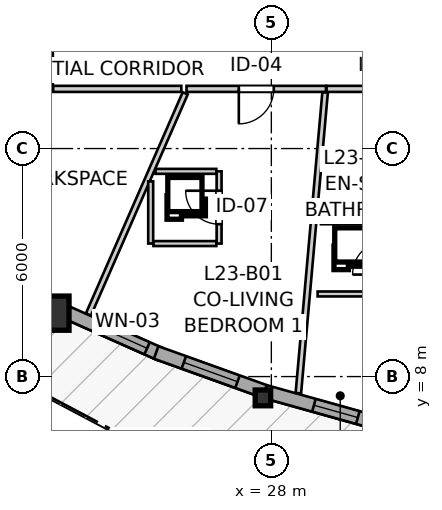
"""IFC4 building model, lengths in metres.
Left out: names, types, materials, properties, quantities, classifications, styles, units other than length and angle.
Written with IfcOpenShell. Run it as: python <this file> out.ifc"""

import sys

from ifc_helpers import new_model, si_unit, direction, frame, frame_2d, origin, origin_2d, place, context, subcontext, project, spatial, rectangle, i_section, extrude, source, transform, mapped, element, fill, save


model = new_model("IFC4")
c1 = context("Model", 3, precision=1e-05, world=origin(), true_north=direction((0.0, 1.0)))
c2 = subcontext(c1, "Body", "Model", "MODEL_VIEW")
j1 = project(units=[si_unit("LENGTHUNIT", "METRE"), si_unit("PLANEANGLEUNIT", "RADIAN")], contexts=[c1])
p1 = place(None, origin())
s1 = spatial("IfcSite", under=j1, at=p1, CompositionType="ELEMENT")
p2 = place(p1, origin())
s2 = spatial("IfcBuilding", under=s1, at=p2, CompositionType="ELEMENT")
p3 = place(p2, frame((0.0, 0.0, 80.0)))
s3 = spatial("IfcBuildingStorey", under=s2, at=p3, CompositionType="ELEMENT", Elevation=80.0)
m1 = source(origin(), c2, "Body", "SweptSolid", [
    extrude(rectangle(XDim=0.9, YDim=0.9, at=origin_2d()), origin(), (0.0, 0.0, 1.0), 2.935),
])
p4 = place(p3, frame((22.227, 9.669, 0.0), z_axis=(0.0, 0.0, 1.0), x_axis=(1.0, 0.0, 0.0)))
e1 = element("IfcColumn", 1, at=p4, inside=s3, PredefinedType="COLUMN", context=c2, shape_type="MappedRepresentation", body=[
    mapped(m1, transform((0.0, 0.0, 0.0), x_axis=(1.0, 0.0, 0.0), y_axis=(0.0, 1.0, 0.0), z_axis=(0.0, 0.0, 1.0), scale=1.0)),
])
m2 = source(origin(), c2, "Body", "SweptSolid", [
    extrude(i_section(OverallWidth=0.406, OverallDepth=0.416, WebThickness=0.027, FlangeThickness=0.044, FilletRadius=0.015, at=origin_2d()), origin(), (0.0, 0.0, 1.0), 2.935),
])
p5 = place(p3, frame((27.779, 7.439, 0.0), z_axis=(0.0, 0.0, 1.0), x_axis=(1.0, 0.0, 0.0)))
e2 = element("IfcColumn", 2, at=p5, inside=s3, PredefinedType="PILASTER", context=c2, shape_type="MappedRepresentation", body=[
    mapped(m2, transform((0.0, 0.0, 0.0), x_axis=(1.0, 0.0, 0.0), y_axis=(0.0, 1.0, 0.0), z_axis=(0.0, 0.0, 1.0), scale=1.0)),
])
p6 = place(p3, frame((22.503, 9.737, 0.0), z_axis=(0.0, 0.0, 1.0), x_axis=(0.913443049169, -0.406966578388, 0.0)))
e3 = element("IfcWall", 3, at=p6, inside=s3, PredefinedType="SOLIDWALL", context=c2, shape_type="SweptSolid", body=[
    extrude(rectangle(XDim=2.79, YDim=0.35, at=frame_2d((1.395, 0.0))), origin(), (0.0, 0.0, 1.0), 2.465),
])
p7 = place(p6, frame((0.938, 0.0, 0.82)))
e4 = element("IfcOpeningElement", 4, at=p7, cuts=e3, PredefinedType="OPENING", context=c2, shape_type="SweptSolid", body=[
    extrude(rectangle(XDim=1.5, YDim=1.45, at=frame_2d((0.75, 0.725))), frame((0.0, 0.185, 0.0), z_axis=(0.0, -1.0, 0.0), x_axis=(1.0, 0.0, 0.0)), (0.0, 0.0, 1.0), 0.37),
])
p8 = place(p3, frame((24.969, 8.635, 0.0), z_axis=(0.0, 0.0, 1.0), x_axis=(0.941099972293, -0.338128440315, 0.0)))
e5 = element("IfcWall", 5, at=p8, inside=s3, PredefinedType="SOLIDWALL", context=c2, shape_type="SweptSolid", body=[
    extrude(rectangle(XDim=3.028, YDim=0.35, at=frame_2d((1.514, 0.0))), origin(), (0.0, 0.0, 1.0), 2.465),
])
p9 = place(p8, frame((0.774, 0.0, 0.82)))
e6 = element("IfcOpeningElement", 6, at=p9, cuts=e5, PredefinedType="OPENING", context=c2, shape_type="SweptSolid", body=[
    extrude(rectangle(XDim=1.5, YDim=1.45, at=frame_2d((0.75, 0.725))), frame((0.0, 0.185, 0.0), z_axis=(0.0, -1.0, 0.0), x_axis=(1.0, 0.0, 0.0)), (0.0, 0.0, 1.0), 0.37),
])
p10 = place(p3, frame((27.845, 7.603, 0.0), z_axis=(0.0, 0.0, 1.0), x_axis=(0.963041412051, -0.269353371382, 0.0)))
e7 = element("IfcWall", 7, at=p10, inside=s3, PredefinedType="SOLIDWALL", context=c2, shape_type="SweptSolid", body=[
    extrude(rectangle(XDim=3.078, YDim=0.35, at=frame_2d((1.539, 0.0))), origin(), (0.0, 0.0, 1.0), 2.465),
])
p11 = place(p10, frame((1.324, 0.0, 0.82)))
e8 = element("IfcOpeningElement", 8, at=p11, cuts=e7, PredefinedType="OPENING", context=c2, shape_type="SweptSolid", body=[
    extrude(rectangle(XDim=1.2, YDim=1.45, at=frame_2d((0.6, 0.725))), frame((0.0, 0.185, 0.0), z_axis=(0.0, -1.0, 0.0), x_axis=(1.0, 0.0, 0.0)), (0.0, 0.0, 1.0), 0.37),
])
p12 = place(p3, frame((22.17, 15.57, 0.0), z_axis=(0.0, 0.0, 1.0), x_axis=(0.0, 1.0, 0.0)))
e9 = element("IfcWall", 9, at=p12, inside=s3, PredefinedType="PARTITIONING", context=c2, shape_type="SweptSolid", body=[
    extrude(rectangle(XDim=5.543, YDim=0.16, at=frame_2d((2.771, 0.0))), origin(), (0.0, 0.0, 1.0), 2.935),
])
p13 = place(p12, frame((2.283, 0.0, 0.0)))
e10 = element("IfcOpeningElement", 10, at=p13, cuts=e9, PredefinedType="OPENING", context=c2, shape_type="SweptSolid", body=[
    extrude(rectangle(XDim=0.96, YDim=2.1, at=frame_2d((0.48, 1.05))), frame((0.0, 0.09, 0.0), z_axis=(0.0, -1.0, 0.0), x_axis=(1.0, 0.0, 0.0)), (0.0, 0.0, 1.0), 0.18),
])
p14 = place(p3, frame((29.438, 15.57, 0.0), z_axis=(0.0, 0.0, 1.0), x_axis=(-1.0, 0.0, 0.0)))
e11 = element("IfcWall", 11, at=p14, inside=s3, PredefinedType="PARTITIONING", context=c2, shape_type="SweptSolid", body=[
    extrude(rectangle(XDim=3.67, YDim=0.16, at=frame_2d((1.835, 0.0))), origin(), (0.0, 0.0, 1.0), 2.935),
])
p15 = place(p14, frame((1.374, 0.0, 0.0)))
e12 = element("IfcOpeningElement", 12, at=p15, cuts=e11, PredefinedType="OPENING", context=c2, shape_type="SweptSolid", body=[
    extrude(rectangle(XDim=0.92, YDim=2.1, at=frame_2d((0.46, 1.05))), frame((0.0, 0.09, 0.0), z_axis=(0.0, -1.0, 0.0), x_axis=(1.0, 0.0, 0.0)), (0.0, 0.0, 1.0), 0.18),
])
p16 = place(p3, frame((32.525, 15.57, 0.0), z_axis=(0.0, 0.0, 1.0), x_axis=(-1.0, 0.0, 0.0)))
e13 = element("IfcWall", 13, at=p16, inside=s3, PredefinedType="PARTITIONING", context=c2, shape_type="SweptSolid", body=[
    extrude(rectangle(XDim=3.072, YDim=0.16, at=frame_2d((1.536, 0.0))), origin(), (0.0, 0.0, 1.0), 2.935),
])
p17 = place(p16, frame((1.098, 0.0, 0.0)))
e14 = element("IfcOpeningElement", 14, at=p17, cuts=e13, PredefinedType="OPENING", context=c2, shape_type="SweptSolid", body=[
    extrude(rectangle(XDim=0.92, YDim=2.1, at=frame_2d((0.46, 1.05))), frame((0.0, 0.09, 0.0), z_axis=(0.0, -1.0, 0.0), x_axis=(1.0, 0.0, 0.0)), (0.0, 0.0, 1.0), 0.18),
])
p18 = place(p3, frame((26.625, 11.5, 0.0), z_axis=(0.0, 0.0, 1.0), x_axis=(0.0, 1.0, 0.0)))
e15 = element("IfcWall", 15, at=p18, inside=s3, PredefinedType="PARTITIONING", context=c2, shape_type="SweptSolid", body=[
    extrude(rectangle(XDim=1.9, YDim=0.13, at=frame_2d((0.95, 0.0))), origin(), (0.0, 0.0, 1.0), 2.935),
])
p19 = place(p18, frame((0.51, 0.0, 0.0)))
e16 = element("IfcOpeningElement", 16, at=p19, cuts=e15, PredefinedType="OPENING", context=c2, shape_type="SweptSolid", body=[
    extrude(rectangle(XDim=0.88, YDim=2.05, at=frame_2d((0.44, 1.025))), frame((0.0, 0.075, 0.0), z_axis=(0.0, -1.0, 0.0), x_axis=(1.0, 0.0, 0.0)), (0.0, 0.0, 1.0), 0.15),
])
p20 = place(p3, frame((28.711, 7.564, 0.0), z_axis=(0.0, 0.0, 1.0), x_axis=(0.088615013812, 0.996065951294, 0.0)))
e17 = element("IfcWall", 17, at=p20, inside=s3, PredefinedType="PARTITIONING", context=c2, shape_type="SweptSolid", body=[
    extrude(rectangle(XDim=7.943, YDim=0.145, at=frame_2d((3.971, 0.0))), origin(), (0.0, 0.0, 1.0), 2.935),
])
p21 = place(p3, frame((23.186, 9.634, 0.0), z_axis=(0.0, 0.0, 1.0), x_axis=(0.400994208685, 0.916080588486, 0.0)))
e18 = element("IfcWall", 18, at=p21, inside=s3, PredefinedType="PARTITIONING", context=c2, shape_type="SweptSolid", body=[
    extrude(rectangle(XDim=6.353, YDim=0.145, at=frame_2d((3.177, 0.0))), origin(), (0.0, 0.0, 1.0), 2.935),
])
p22 = place(p3, frame((22.258, 15.57, 0.0), z_axis=(0.0, 0.0, 1.0), x_axis=(1.0, 0.0, 0.0)))
e19 = element("IfcWall", 19, at=p22, inside=s3, PredefinedType="PARTITIONING", context=c2, shape_type="SweptSolid", body=[
    extrude(rectangle(XDim=3.373, YDim=0.16, at=frame_2d((1.687, 0.0))), origin(), (0.0, 0.0, 1.0), 2.935),
])
p23 = place(p3, frame((24.825, 11.5, 0.0), z_axis=(0.0, 0.0, 1.0), x_axis=(0.0, 1.0, 0.0)))
e20 = element("IfcWall", 20, at=p23, inside=s3, PredefinedType="PARTITIONING", context=c2, shape_type="SweptSolid", body=[
    extrude(rectangle(XDim=1.637, YDim=0.13, at=frame_2d((0.818, 0.0))), origin(), (0.0, 0.0, 1.0), 2.935),
])
p24 = place(p3, frame((24.898, 11.5, 0.0), z_axis=(0.0, 0.0, 1.0), x_axis=(1.0, 0.0, 0.0)))
e21 = element("IfcWall", 21, at=p24, inside=s3, PredefinedType="PARTITIONING", context=c2, shape_type="SweptSolid", body=[
    extrude(rectangle(XDim=1.654, YDim=0.13, at=frame_2d((0.827, 0.0))), origin(), (0.0, 0.0, 1.0), 2.543),
])
p25 = place(p3, frame((29.305, 12.074, 0.0), z_axis=(0.0, 0.0, 1.0), x_axis=(1.0, 0.0, 0.0)))
e22 = element("IfcWall", 22, at=p25, inside=s3, PredefinedType="PARTITIONING", context=c2, shape_type="SweptSolid", body=[
    extrude(rectangle(XDim=1.64, YDim=0.13, at=frame_2d((0.82, 0.0))), origin(), (0.0, 0.0, 1.0), 2.935),
])
p26 = place(p3, frame((29.218, 10.174, 0.0), z_axis=(0.0, 0.0, 1.0), x_axis=(1.0, 0.0, 0.0)))
e23 = element("IfcWall", 23, at=p26, inside=s3, PredefinedType="PARTITIONING", context=c2, shape_type="SweptSolid", body=[
    extrude(rectangle(XDim=1.727, YDim=0.13, at=frame_2d((0.864, 0.0))), origin(), (0.0, 0.0, 1.0), 2.543),
])
p27 = place(p3, frame((24.951, 13.4, 0.0), z_axis=(0.0, 0.0, 1.0), x_axis=(1.0, 0.0, 0.0)))
e24 = element("IfcWall", 24, at=p27, inside=s3, PredefinedType="PARTITIONING", context=c2, shape_type="SweptSolid", body=[
    extrude(rectangle(XDim=1.601, YDim=0.13, at=frame_2d((0.801, 0.0))), origin(), (0.0, 0.0, 1.0), 2.935),
])
m3 = source(origin(), c2, "Body", "SweptSolid", [
    extrude(rectangle(XDim=1.5, YDim=1.45, at=frame_2d((0.75, 0.725))), frame((0.0, 0.03, 0.0), z_axis=(0.0, -1.0, 0.0), x_axis=(1.0, 0.0, 0.0)), (0.0, 0.0, 1.0), 0.06),
])
p28 = place(p7, origin())
e25 = element("IfcWindow", 25, at=p28, inside=s3, PartitioningType="SINGLE_PANEL", PredefinedType="WINDOW", context=c2, shape_type="MappedRepresentation", body=[
    mapped(m3, transform((0.0, 0.0, 0.0), x_axis=(1.0, 0.0, 0.0), y_axis=(0.0, 1.0, 0.0), z_axis=(0.0, 0.0, 1.0), scale=1.0)),
])
fill(e4, e25)
p29 = place(p9, origin())
e26 = element("IfcWindow", 26, at=p29, inside=s3, PartitioningType="SINGLE_PANEL", PredefinedType="WINDOW", context=c2, shape_type="MappedRepresentation", body=[
    mapped(m3, transform((0.0, 0.0, 0.0), x_axis=(1.0, 0.0, 0.0), y_axis=(0.0, 1.0, 0.0), z_axis=(0.0, 0.0, 1.0), scale=1.0)),
])
fill(e6, e26)
m4 = source(origin(), c2, "Body", "SweptSolid", [
    extrude(rectangle(XDim=1.2, YDim=1.45, at=frame_2d((0.6, 0.725))), frame((0.0, 0.03, 0.0), z_axis=(0.0, -1.0, 0.0), x_axis=(1.0, 0.0, 0.0)), (0.0, 0.0, 1.0), 0.06),
])
p30 = place(p11, origin())
e27 = element("IfcWindow", 27, at=p30, inside=s3, PartitioningType="SINGLE_PANEL", PredefinedType="WINDOW", context=c2, shape_type="MappedRepresentation", body=[
    mapped(m4, transform((0.0, 0.0, 0.0), x_axis=(1.0, 0.0, 0.0), y_axis=(0.0, 1.0, 0.0), z_axis=(0.0, 0.0, 1.0), scale=1.0)),
])
fill(e8, e27)
m5 = source(origin(), c2, "Body", "SweptSolid", [
    extrude(rectangle(XDim=0.92, YDim=2.1, at=frame_2d((0.46, 1.05))), frame((0.0, 0.025, 0.0), z_axis=(0.0, -1.0, 0.0), x_axis=(1.0, 0.0, 0.0)), (0.0, 0.0, 1.0), 0.05),
])
p31 = place(p15, origin())
e28 = element("IfcDoor", 28, at=p31, inside=s3, OperationType="SINGLE_SWING_RIGHT", PredefinedType="DOOR", context=c2, shape_type="MappedRepresentation", body=[
    mapped(m5, transform((0.0, 0.0, 0.0), x_axis=(1.0, 0.0, 0.0), y_axis=(0.0, 1.0, 0.0), z_axis=(0.0, 0.0, 1.0), scale=1.0)),
])
fill(e12, e28)
m6 = source(origin(), c2, "Body", "SweptSolid", [
    extrude(rectangle(XDim=0.88, YDim=2.05, at=frame_2d((0.44, 1.025))), frame((0.0, 0.025, 0.0), z_axis=(0.0, -1.0, 0.0), x_axis=(1.0, 0.0, 0.0)), (0.0, 0.0, 1.0), 0.05),
])
p32 = place(p19, origin())
e29 = element("IfcDoor", 29, at=p32, inside=s3, OperationType="SINGLE_SWING_RIGHT", PredefinedType="DOOR", context=c2, shape_type="MappedRepresentation", body=[
    mapped(m6, transform((0.0, 0.0, 0.0), x_axis=(1.0, 0.0, 0.0), y_axis=(0.0, 1.0, 0.0), z_axis=(0.0, 0.0, 1.0), scale=1.0)),
])
fill(e16, e29)
save(model, sys.argv[1])
